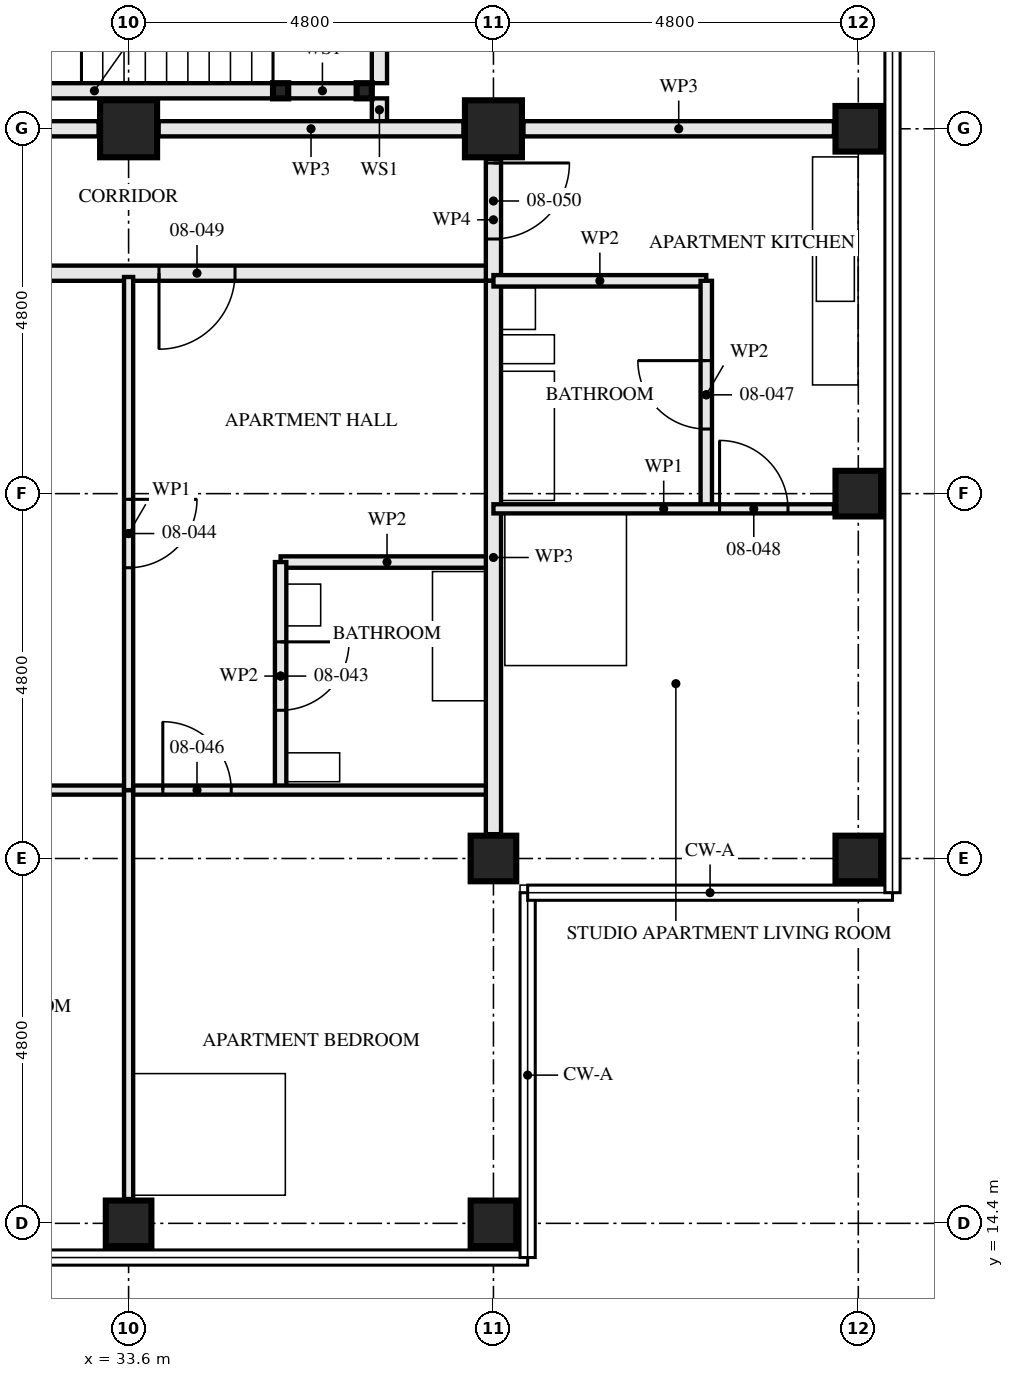
"""IFC4 building model, lengths in metres.
Left out: names, types, materials, properties, quantities, classifications, styles, units other than length and angle.
Written with IfcOpenShell. Run it as: python <this file> out.ifc"""

import sys

from ifc_helpers import new_model, si_unit, direction, frame, frame_2d, origin, origin_2d, place, context, subcontext, project, spatial, rectangle, hollow_rectangle, extrude, element, fill, save


model = new_model("IFC4")
c1 = context("Model", 3, precision=1e-05, world=origin(), true_north=direction((0.0, 1.0)))
c2 = subcontext(c1, "Body", "Model", "MODEL_VIEW")
j1 = project(units=[si_unit("LENGTHUNIT", "METRE"), si_unit("PLANEANGLEUNIT", "RADIAN")], contexts=[c1])
p1 = place(None, origin())
s1 = spatial("IfcSite", under=j1, at=p1, CompositionType="ELEMENT")
p2 = place(p1, origin())
s2 = spatial("IfcBuilding", under=s1, at=p2, CompositionType="ELEMENT")
p3 = place(p2, frame((0.0, 0.0, 34.0)))
s3 = spatial("IfcBuildingStorey", under=s2, at=p3, CompositionType="ELEMENT", Elevation=34.0)
p4 = place(p3, frame((33.6, 14.4, 0.0), z_axis=(0.0, 0.0, 1.0), x_axis=(0.0, 1.0, 0.0)))
e1 = element("IfcColumn", 1, at=p4, inside=s3, PredefinedType="COLUMN", context=c2, shape_type="SweptSolid", body=[
    extrude(hollow_rectangle(XDim=0.6, YDim=0.6, WallThickness=0.08, at=origin_2d()), origin(), (0.0, 0.0, 1.0), 3.5),
])
p5 = place(p3, frame((33.6, 28.8, 0.0), z_axis=(0.0, 0.0, 1.0), x_axis=(0.0, 1.0, 0.0)))
e2 = element("IfcColumn", 2, at=p5, inside=s3, PredefinedType="COLUMN", context=c2, shape_type="SweptSolid", body=[
    extrude(hollow_rectangle(XDim=0.75, YDim=0.75, WallThickness=0.08, at=origin_2d()), origin(), (0.0, 0.0, 1.0), 3.5),
])
for number, where, z_axis, x_axis in (
    (3, (38.4, 14.4, 0.0), (0.0, 0.0, 1.0), (0.0, 1.0, 0.0)),
    (4, (38.4, 19.2, 0.0), (0.0, 0.0, 1.0), (0.0, 1.0, 0.0)),
):
    element("IfcColumn", number, at=place(p3, frame(where, z_axis=z_axis, x_axis=x_axis)), inside=s3, PredefinedType="COLUMN", context=c2, shape_type="SweptSolid", body=[
        extrude(hollow_rectangle(XDim=0.6, YDim=0.6, WallThickness=0.08, at=origin_2d()), origin(), (0.0, 0.0, 1.0), 3.5),
    ])
p6 = place(p3, frame((38.4, 28.8, 0.0), z_axis=(0.0, 0.0, 1.0), x_axis=(0.0, 1.0, 0.0)))
e5 = element("IfcColumn", 5, at=p6, inside=s3, PredefinedType="COLUMN", context=c2, shape_type="SweptSolid", body=[
    extrude(hollow_rectangle(XDim=0.75, YDim=0.75, WallThickness=0.08, at=origin_2d()), origin(), (0.0, 0.0, 1.0), 3.5),
])
for number, where, z_axis, x_axis in (
    (6, (43.2, 19.2, 0.0), (0.0, 0.0, 1.0), (0.0, 1.0, 0.0)),
    (7, (43.2, 24.0, 0.0), (0.0, 0.0, 1.0), (1.0, 0.0, 0.0)),
    (8, (43.2, 28.8, 0.0), (0.0, 0.0, 1.0), (0.0, 1.0, 0.0)),
):
    element("IfcColumn", number, at=place(p3, frame(where, z_axis=z_axis, x_axis=x_axis)), inside=s3, PredefinedType="COLUMN", context=c2, shape_type="SweptSolid", body=[
        extrude(hollow_rectangle(XDim=0.6, YDim=0.6, WallThickness=0.08, at=origin_2d()), origin(), (0.0, 0.0, 1.0), 3.5),
    ])
for number, where, z_axis, x_axis in (
    (9, (36.7, 29.3, 0.0), (0.0, 0.0, 1.0), (1.0, 0.0, 0.0)),
    (10, (35.6, 29.3, 0.0), (0.0, 0.0, 1.0), (1.0, 0.0, 0.0)),
):
    element("IfcColumn", number, at=place(p3, frame(where, z_axis=z_axis, x_axis=x_axis)), inside=s3, PredefinedType="COLUMN", context=c2, shape_type="SweptSolid", body=[
        extrude(hollow_rectangle(XDim=0.2, YDim=0.2, WallThickness=0.008, at=origin_2d()), origin(), (0.0, 0.0, 1.0), 3.33),
    ])
p7 = place(p3, frame((35.6, 20.1, 0.0), z_axis=(0.0, 0.0, 1.0), x_axis=(0.0, 1.0, 0.0)))
e11 = element("IfcWall", 11, at=p7, inside=s3, PredefinedType="PARTITIONING", context=c2, shape_type="SweptSolid", body=[
    extrude(rectangle(XDim=3.0, YDim=0.15, at=frame_2d((1.5, 0.0))), origin(), (0.0, 0.0, 1.0), 3.33),
])
p8 = place(p7, frame((1.05, 0.0, 0.0)))
e12 = element("IfcOpeningElement", 12, at=p8, cuts=e11, PredefinedType="OPENING", context=c2, shape_type="SweptSolid", body=[
    extrude(rectangle(XDim=0.9, YDim=2.1, at=frame_2d((0.45, 1.05))), frame((0.0, 0.085, 0.0), z_axis=(0.0, -1.0, 0.0), x_axis=(1.0, 0.0, 0.0)), (0.0, 0.0, 1.0), 0.171),
])
p9 = place(p3, frame((35.6, 23.1, 0.0), z_axis=(0.0, 0.0, 1.0), x_axis=(1.0, 0.0, 0.0)))
e13 = element("IfcWall", 13, at=p9, inside=s3, PredefinedType="PARTITIONING", context=c2, shape_type="SweptSolid", body=[
    extrude(rectangle(XDim=2.8, YDim=0.15, at=frame_2d((1.4, 0.0))), origin(), (0.0, 0.0, 1.0), 3.33),
])
p10 = place(p3, frame((33.6, 20.1, 0.0), z_axis=(0.0, 0.0, 1.0), x_axis=(0.0, 1.0, 0.0)))
e14 = element("IfcWall", 14, at=p10, inside=s3, PredefinedType="PARTITIONING", context=c2, shape_type="SweptSolid", body=[
    extrude(rectangle(XDim=6.75, YDim=0.12, at=frame_2d((3.375, 0.0))), origin(), (0.0, 0.0, 1.0), 2.55),
])
p11 = place(p10, frame((2.925, 0.0, 0.0)))
e15 = element("IfcOpeningElement", 15, at=p11, cuts=e14, PredefinedType="OPENING", context=c2, shape_type="SweptSolid", body=[
    extrude(rectangle(XDim=0.9, YDim=2.1, at=frame_2d((0.45, 1.05))), frame((0.0, 0.071, 0.0), z_axis=(0.0, -1.0, 0.0), x_axis=(1.0, 0.0, 0.0)), (0.0, 0.0, 1.0), 0.141),
])
p12 = place(p3, frame((28.8, 20.1, 0.0), z_axis=(0.0, 0.0, 1.0), x_axis=(1.0, 0.0, 0.0)))
e16 = element("IfcWall", 16, at=p12, inside=s3, PredefinedType="PARTITIONING", context=c2, shape_type="SweptSolid", body=[
    extrude(rectangle(XDim=4.8, YDim=0.12, at=frame_2d((2.4, 0.0))), origin(), (0.0, 0.0, 1.0), 3.33),
])
p13 = place(p12, frame((0.45, 0.0, 0.0)))
e17 = element("IfcOpeningElement", 17, at=p13, cuts=e16, PredefinedType="OPENING", context=c2, shape_type="SweptSolid", body=[
    extrude(rectangle(XDim=0.9, YDim=2.1, at=frame_2d((0.45, 1.05))), frame((0.0, 0.071, 0.0), z_axis=(0.0, -1.0, 0.0), x_axis=(1.0, 0.0, 0.0)), (0.0, 0.0, 1.0), 0.141),
])
p14 = place(p3, frame((33.6, 20.1, 0.0), z_axis=(0.0, 0.0, 1.0), x_axis=(1.0, 0.0, 0.0)))
e18 = element("IfcWall", 18, at=p14, inside=s3, PredefinedType="PARTITIONING", context=c2, shape_type="SweptSolid", body=[
    extrude(rectangle(XDim=4.8, YDim=0.12, at=frame_2d((2.4, 0.0))), origin(), (0.0, 0.0, 1.0), 3.33),
])
p15 = place(p14, frame((0.45, 0.0, 0.0)))
e19 = element("IfcOpeningElement", 19, at=p15, cuts=e18, PredefinedType="OPENING", context=c2, shape_type="SweptSolid", body=[
    extrude(rectangle(XDim=0.9, YDim=2.1, at=frame_2d((0.45, 1.05))), frame((0.0, 0.071, 0.0), z_axis=(0.0, -1.0, 0.0), x_axis=(1.0, 0.0, 0.0)), (0.0, 0.0, 1.0), 0.141),
])
p16 = place(p3, frame((33.6, 14.72, 0.0), z_axis=(0.0, 0.0, 1.0), x_axis=(0.0, 1.0, 0.0)))
e20 = element("IfcWall", 20, at=p16, inside=s3, PredefinedType="PARTITIONING", context=c2, shape_type="SweptSolid", body=[
    extrude(rectangle(XDim=5.38, YDim=0.12, at=frame_2d((2.69, 0.0))), origin(), (0.0, 0.0, 1.0), 2.55),
])
p17 = place(p3, frame((38.4, 19.52, 0.0), z_axis=(0.0, 0.0, 1.0), x_axis=(0.0, 1.0, 0.0)))
e21 = element("IfcWall", 21, at=p17, inside=s3, PredefinedType="PARTITIONING", context=c2, shape_type="SweptSolid", body=[
    extrude(rectangle(XDim=7.28, YDim=0.2, at=frame_2d((3.64, 0.0))), origin(), (0.0, 0.0, 1.0), 2.55),
])
p18 = place(p3, frame((41.2, 23.8, 0.0), z_axis=(0.0, 0.0, 1.0), x_axis=(0.0, 1.0, 0.0)))
e22 = element("IfcWall", 22, at=p18, inside=s3, PredefinedType="PARTITIONING", context=c2, shape_type="SweptSolid", body=[
    extrude(rectangle(XDim=3.0, YDim=0.15, at=frame_2d((1.5, 0.0))), origin(), (0.0, 0.0, 1.0), 2.55),
])
p19 = place(p18, frame((1.05, 0.0, 0.0)))
e23 = element("IfcOpeningElement", 23, at=p19, cuts=e22, PredefinedType="OPENING", context=c2, shape_type="SweptSolid", body=[
    extrude(rectangle(XDim=0.9, YDim=2.1, at=frame_2d((0.45, 1.05))), frame((0.0, 0.085, 0.0), z_axis=(0.0, -1.0, 0.0), x_axis=(1.0, 0.0, 0.0)), (0.0, 0.0, 1.0), 0.171),
])
p20 = place(p3, frame((38.4, 26.8, 0.0), z_axis=(0.0, 0.0, 1.0), x_axis=(1.0, 0.0, 0.0)))
e24 = element("IfcWall", 24, at=p20, inside=s3, PredefinedType="PARTITIONING", context=c2, shape_type="SweptSolid", body=[
    extrude(rectangle(XDim=2.8, YDim=0.15, at=frame_2d((1.4, 0.0))), origin(), (0.0, 0.0, 1.0), 3.33),
])
p21 = place(p3, frame((38.4, 23.8, 0.0), z_axis=(0.0, 0.0, 1.0), x_axis=(1.0, 0.0, 0.0)))
e25 = element("IfcWall", 25, at=p21, inside=s3, PredefinedType="PARTITIONING", context=c2, shape_type="SweptSolid", body=[
    extrude(rectangle(XDim=4.48, YDim=0.12, at=frame_2d((2.24, 0.0))), origin(), (0.0, 0.0, 1.0), 3.33),
])
p22 = place(p21, frame((2.975, 0.0, 0.0)))
e26 = element("IfcOpeningElement", 26, at=p22, cuts=e25, PredefinedType="OPENING", context=c2, shape_type="SweptSolid", body=[
    extrude(rectangle(XDim=0.9, YDim=2.1, at=frame_2d((0.45, 1.05))), frame((0.0, 0.071, 0.0), z_axis=(0.0, -1.0, 0.0), x_axis=(1.0, 0.0, 0.0)), (0.0, 0.0, 1.0), 0.141),
])
p23 = place(p3, frame((28.8, 26.9, 0.0), z_axis=(0.0, 0.0, 1.0), x_axis=(1.0, 0.0, 0.0)))
e27 = element("IfcWall", 27, at=p23, inside=s3, PredefinedType="PARTITIONING", context=c2, shape_type="SweptSolid", body=[
    extrude(rectangle(XDim=9.6, YDim=0.2, at=frame_2d((4.8, 0.0))), origin(), (0.0, 0.0, 1.0), 3.33),
])
p24 = place(p23, frame((5.2, 0.0, 0.0)))
e28 = element("IfcOpeningElement", 28, at=p24, cuts=e27, PredefinedType="OPENING", context=c2, shape_type="SweptSolid", body=[
    extrude(rectangle(XDim=1.0, YDim=2.1, at=frame_2d((0.5, 1.05))), frame((0.0, 0.111, 0.0), z_axis=(0.0, -1.0, 0.0), x_axis=(1.0, 0.0, 0.0)), (0.0, 0.0, 1.0), 0.221),
])
p25 = place(p3, frame((38.4, 26.8, 0.0), z_axis=(0.0, 0.0, 1.0), x_axis=(0.0, 1.0, 0.0)))
e29 = element("IfcWall", 29, at=p25, inside=s3, PredefinedType="PARTITIONING", context=c2, shape_type="SweptSolid", body=[
    extrude(rectangle(XDim=1.605, YDim=0.2, at=frame_2d((0.802, 0.0))), origin(), (0.0, 0.0, 1.0), 3.33),
])
p26 = place(p25, frame((0.55, 0.0, 0.0)))
e30 = element("IfcOpeningElement", 30, at=p26, cuts=e29, PredefinedType="OPENING", context=c2, shape_type="SweptSolid", body=[
    extrude(rectangle(XDim=1.0, YDim=2.1, at=frame_2d((0.5, 1.05))), frame((0.0, 0.111, 0.0), z_axis=(0.0, -1.0, 0.0), x_axis=(1.0, 0.0, 0.0)), (0.0, 0.0, 1.0), 0.221),
])
p27 = place(p3, frame((36.6, 29.3, 0.0), z_axis=(0.0, 0.0, 1.0), x_axis=(-1.0, 0.0, 0.0)))
e31 = element("IfcWall", 31, at=p27, inside=s3, PredefinedType="SOLIDWALL", context=c2, shape_type="SweptSolid", body=[
    extrude(rectangle(XDim=0.9, YDim=0.2, at=frame_2d((0.45, 0.0))), origin(), (0.0, 0.0, 1.0), 2.99),
])
p28 = place(p3, frame((35.5, 29.3, 0.0), z_axis=(0.0, 0.0, 1.0), x_axis=(-1.0, 0.0, 0.0)))
e32 = element("IfcWall", 32, at=p28, inside=s3, PredefinedType="SOLIDWALL", context=c2, shape_type="SweptSolid", body=[
    extrude(rectangle(XDim=4.7, YDim=0.2, at=frame_2d((2.35, 0.0))), origin(), (0.0, 0.0, 1.0), 2.99),
])
p29 = place(p3, frame((36.9, 28.9, 0.0), z_axis=(0.0, 0.0, 1.0), x_axis=(0.0, 1.0, 0.0)))
e33 = element("IfcWall", 33, at=p29, inside=s3, PredefinedType="SOLIDWALL", context=c2, shape_type="SweptSolid", body=[
    extrude(rectangle(XDim=0.3, YDim=0.2, at=frame_2d((0.15, 0.0))), origin(), (0.0, 0.0, 1.0), 3.33),
])
p30 = place(p3, frame((36.9, 29.4, 0.0), z_axis=(0.0, 0.0, 1.0), x_axis=(0.0, 1.0, 0.0)))
e34 = element("IfcWall", 34, at=p30, inside=s3, PredefinedType="SOLIDWALL", context=c2, shape_type="SweptSolid", body=[
    extrude(rectangle(XDim=2.6, YDim=0.2, at=frame_2d((1.3, 0.0))), origin(), (0.0, 0.0, 1.0), 3.33),
])
p31 = place(p3, frame((42.88, 28.8, 0.0), z_axis=(0.0, 0.0, 1.0), x_axis=(-1.0, 0.0, 0.0)))
e35 = element("IfcWall", 35, at=p31, inside=s3, PredefinedType="PARTITIONING", context=c2, shape_type="SweptSolid", body=[
    extrude(rectangle(XDim=4.085, YDim=0.2, at=frame_2d((2.042, 0.0))), origin(), (0.0, 0.0, 1.0), 2.32),
])
p32 = place(p3, frame((38.005, 28.8, 0.0), z_axis=(0.0, 0.0, 1.0), x_axis=(-1.0, 0.0, 0.0)))
e36 = element("IfcWall", 36, at=p32, inside=s3, PredefinedType="PARTITIONING", context=c2, shape_type="SweptSolid", body=[
    extrude(rectangle(XDim=4.01, YDim=0.2, at=frame_2d((2.005, 0.0))), origin(), (0.0, 0.0, 1.0), 2.32),
])
p33 = place(p3, frame((33.205, 28.8, 0.0), z_axis=(0.0, 0.0, 1.0), x_axis=(-1.0, 0.0, 0.0)))
e37 = element("IfcWall", 37, at=p33, inside=s3, PredefinedType="PARTITIONING", context=c2, shape_type="SweptSolid", body=[
    extrude(rectangle(XDim=2.505, YDim=0.2, at=frame_2d((1.252, 0.0))), origin(), (0.0, 0.0, 1.0), 2.32),
])
p34 = place(p8, frame((0.9, 0.0, 0.0), z_axis=(0.0, 0.0, 1.0), x_axis=(-1.0, 0.0, 0.0)))
e38 = element("IfcDoor", 38, at=p34, inside=s3, OperationType="SINGLE_SWING_RIGHT", PredefinedType="DOOR", context=c2, shape_type="SweptSolid", body=[
    extrude(rectangle(XDim=0.9, YDim=2.1, at=frame_2d((0.45, 1.05))), frame((0.0, 0.022, 0.0), z_axis=(0.0, -1.0, 0.0), x_axis=(1.0, 0.0, 0.0)), (0.0, 0.0, 1.0), 0.044),
])
fill(e12, e38)
p35 = place(p11, frame((0.9, 0.0, 0.0), z_axis=(0.0, 0.0, 1.0), x_axis=(-1.0, 0.0, 0.0)))
e39 = element("IfcDoor", 39, at=p35, inside=s3, OperationType="SINGLE_SWING_RIGHT", PredefinedType="DOOR", context=c2, shape_type="SweptSolid", body=[
    extrude(rectangle(XDim=0.9, YDim=2.1, at=frame_2d((0.45, 1.05))), frame((0.0, 0.022, 0.0), z_axis=(0.0, -1.0, 0.0), x_axis=(1.0, 0.0, 0.0)), (0.0, 0.0, 1.0), 0.044),
])
fill(e15, e39)
p36 = place(p15, origin())
e40 = element("IfcDoor", 40, at=p36, inside=s3, OperationType="SINGLE_SWING_RIGHT", PredefinedType="DOOR", context=c2, shape_type="SweptSolid", body=[
    extrude(rectangle(XDim=0.9, YDim=2.1, at=frame_2d((0.45, 1.05))), frame((0.0, 0.022, 0.0), z_axis=(0.0, -1.0, 0.0), x_axis=(1.0, 0.0, 0.0)), (0.0, 0.0, 1.0), 0.044),
])
fill(e19, e40)
p37 = place(p19, origin())
e41 = element("IfcDoor", 41, at=p37, inside=s3, OperationType="SINGLE_SWING_LEFT", PredefinedType="DOOR", context=c2, shape_type="SweptSolid", body=[
    extrude(rectangle(XDim=0.9, YDim=2.1, at=frame_2d((0.45, 1.05))), frame((0.0, 0.022, 0.0), z_axis=(0.0, -1.0, 0.0), x_axis=(1.0, 0.0, 0.0)), (0.0, 0.0, 1.0), 0.044),
])
fill(e23, e41)
p38 = place(p22, origin())
e42 = element("IfcDoor", 42, at=p38, inside=s3, OperationType="SINGLE_SWING_RIGHT", PredefinedType="DOOR", context=c2, shape_type="SweptSolid", body=[
    extrude(rectangle(XDim=0.9, YDim=2.1, at=frame_2d((0.45, 1.05))), frame((0.0, 0.022, 0.0), z_axis=(0.0, -1.0, 0.0), x_axis=(1.0, 0.0, 0.0)), (0.0, 0.0, 1.0), 0.044),
])
fill(e26, e42)
p39 = place(p24, frame((1.0, 0.0, 0.0), z_axis=(0.0, 0.0, 1.0), x_axis=(-1.0, 0.0, 0.0)))
e43 = element("IfcDoor", 43, at=p39, inside=s3, OperationType="SINGLE_SWING_LEFT", PredefinedType="DOOR", context=c2, shape_type="SweptSolid", body=[
    extrude(rectangle(XDim=1.0, YDim=2.1, at=frame_2d((0.5, 1.05))), frame((0.0, 0.027, 0.0), z_axis=(0.0, -1.0, 0.0), x_axis=(1.0, 0.0, 0.0)), (0.0, 0.0, 1.0), 0.054),
])
fill(e28, e43)
p40 = place(p26, frame((1.0, 0.0, 0.0), z_axis=(0.0, 0.0, 1.0), x_axis=(-1.0, 0.0, 0.0)))
e44 = element("IfcDoor", 44, at=p40, inside=s3, OperationType="SINGLE_SWING_RIGHT", PredefinedType="DOOR", context=c2, shape_type="SweptSolid", body=[
    extrude(rectangle(XDim=1.0, YDim=2.1, at=frame_2d((0.5, 1.05))), frame((0.0, 0.027, 0.0), z_axis=(0.0, -1.0, 0.0), x_axis=(1.0, 0.0, 0.0)), (0.0, 0.0, 1.0), 0.054),
])
fill(e30, e44)
save(model, sys.argv[1])
